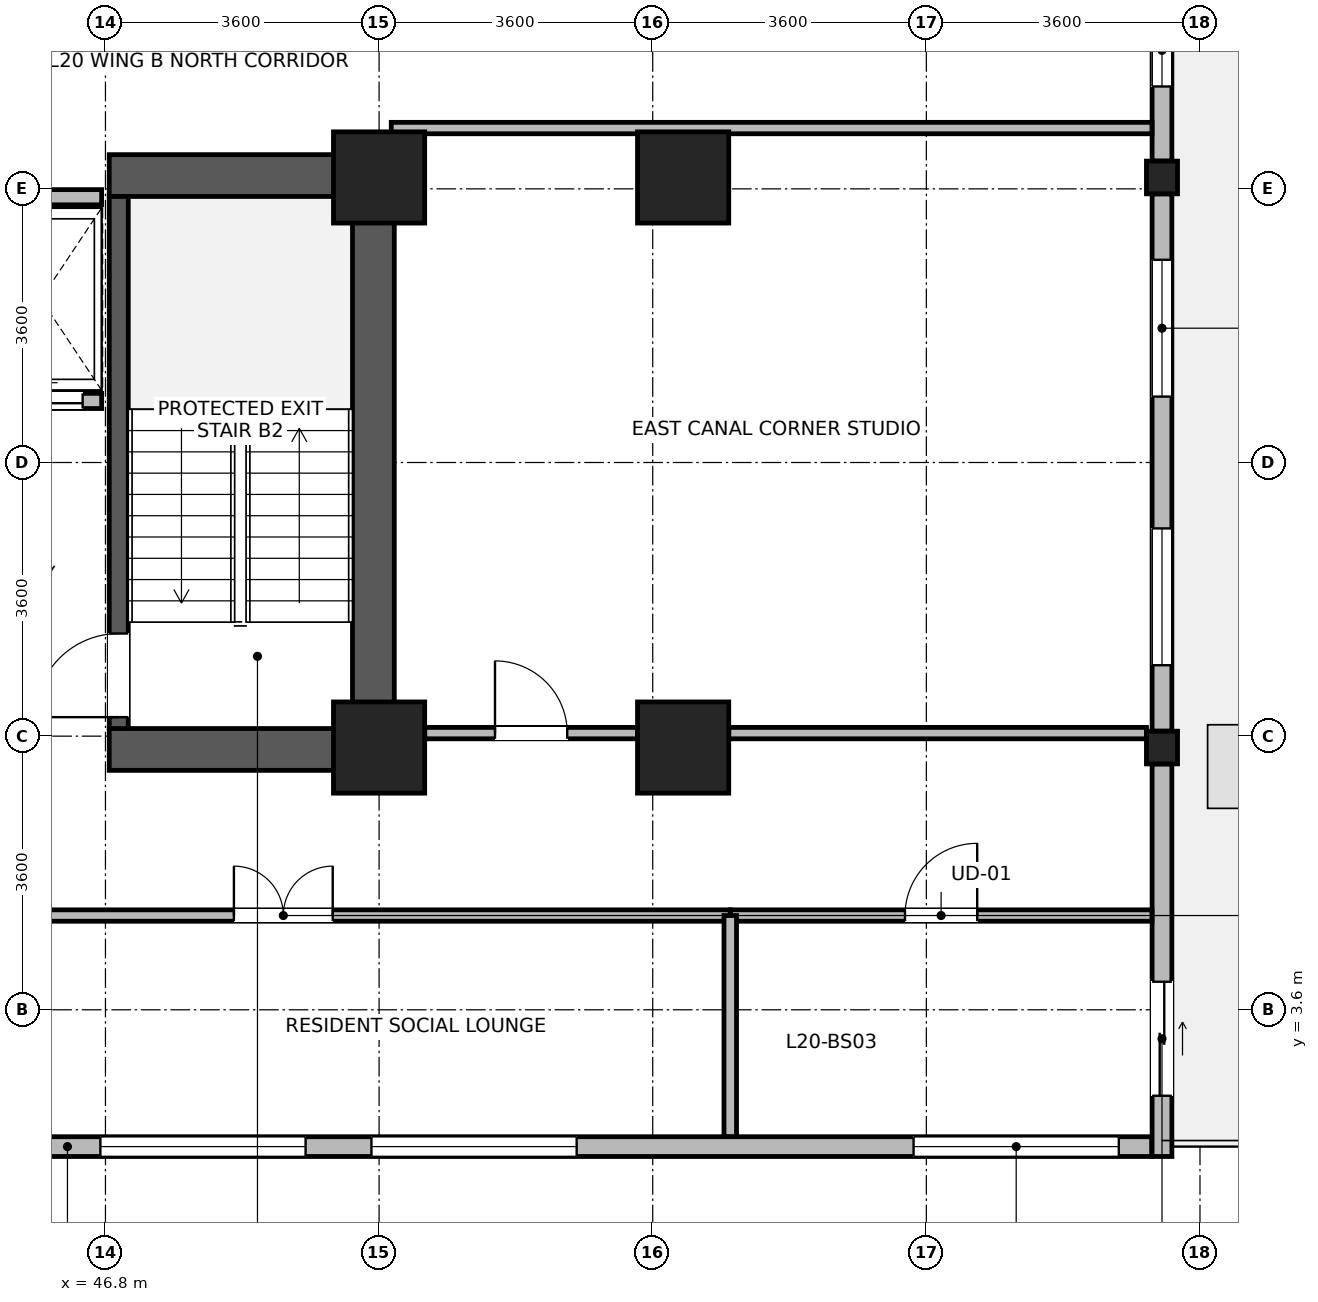
"""IFC4 building model, lengths in metres.
Left out: names, types, materials, properties, quantities, classifications, styles, units other than length and angle.
Written with IfcOpenShell. Run it as: python <this file> out.ifc"""

import sys

from ifc_helpers import new_model, si_unit, direction, frame, frame_2d, origin, origin_2d, place, context, subcontext, project, spatial, rectangle, i_section, extrude, source, transform, mapped, element, fill, save


model = new_model("IFC4")
c1 = context("Model", 3, precision=1e-05, world=origin(), true_north=direction((0.0, 1.0)))
c2 = subcontext(c1, "Body", "Model", "MODEL_VIEW")
j1 = project(units=[si_unit("LENGTHUNIT", "METRE"), si_unit("PLANEANGLEUNIT", "RADIAN")], contexts=[c1])
p1 = place(None, origin())
s1 = spatial("IfcSite", under=j1, at=p1, CompositionType="ELEMENT")
p2 = place(p1, origin())
s2 = spatial("IfcBuilding", under=s1, at=p2, CompositionType="ELEMENT")
p3 = place(p2, frame((0.0, 0.0, 82.3)))
s3 = spatial("IfcBuildingStorey", under=s2, at=p3, CompositionType="ELEMENT", Elevation=82.3)
p4 = place(p3, frame((50.325, 6.75, 0.0), z_axis=(0.0, 0.0, 1.0), x_axis=(0.0, 1.0, 0.0)))
e1 = element("IfcWall", 1, at=p4, inside=s3, PredefinedType="SHEAR", context=c2, shape_type="SweptSolid", body=[
    extrude(rectangle(XDim=8.1, YDim=0.55, at=frame_2d((4.05, 0.0))), origin(), (0.0, 0.0, 1.0), 3.45),
])
for number, where, z_axis, x_axis in (
    (2, (46.85, 7.025, 0.0), (0.0, 0.0, 1.0), (1.0, 0.0, 0.0)),
    (3, (46.85, 14.575, 0.0), (0.0, 0.0, 1.0), (1.0, 0.0, 0.0)),
):
    element("IfcWall", number, at=place(p3, frame(where, z_axis=z_axis, x_axis=x_axis)), inside=s3, PredefinedType="SHEAR", context=c2, shape_type="SweptSolid", body=[
        extrude(rectangle(XDim=3.2, YDim=0.55, at=frame_2d((1.6, 0.0))), origin(), (0.0, 0.0, 1.0), 3.45),
    ])
p5 = place(p3, frame((46.975, 7.3, 0.0), z_axis=(0.0, 0.0, 1.0), x_axis=(0.0, 1.0, 0.0)))
e4 = element("IfcWall", 4, at=p5, inside=s3, PredefinedType="SHEAR", context=c2, shape_type="SweptSolid", body=[
    extrude(rectangle(XDim=7.0, YDim=0.25, at=frame_2d((3.5, 0.0))), origin(), (0.0, 0.0, 1.0), 3.45),
])
p6 = place(p5, frame((0.15, 0.0, 0.0)))
e5 = element("IfcOpeningElement", 5, at=p6, cuts=e4, PredefinedType="OPENING", context=c2, shape_type="SweptSolid", body=[
    extrude(rectangle(XDim=1.1, YDim=2.08, at=frame_2d((0.55, 1.04))), frame((0.0, 0.135, 0.0), z_axis=(0.0, -1.0, 0.0), x_axis=(1.0, 0.0, 0.0)), (0.0, 0.0, 1.0), 0.27),
])
m1 = source(origin(), c2, "Body", "SweptSolid", [
    extrude(rectangle(XDim=1.2, YDim=1.2, at=origin_2d()), origin(), (0.0, 0.0, 1.0), 3.7),
])
for number, where, z_axis, x_axis in (
    (6, (50.4, 7.05, 0.0), (0.0, 0.0, 1.0), (1.0, 0.0, 0.0)),
    (7, (50.4, 14.55, 0.0), (0.0, 0.0, 1.0), (1.0, 0.0, 0.0)),
    (8, (54.4, 7.05, 0.0), (0.0, 0.0, 1.0), (1.0, 0.0, 0.0)),
    (9, (54.4, 14.55, 0.0), (0.0, 0.0, 1.0), (1.0, 0.0, 0.0)),
):
    element("IfcColumn", number, at=place(p3, frame(where, z_axis=z_axis, x_axis=x_axis)), inside=s3, PredefinedType="COLUMN", context=c2, shape_type="MappedRepresentation", body=[
        mapped(m1, transform((0.0, 0.0, 0.0), x_axis=(1.0, 0.0, 0.0), y_axis=(0.0, 1.0, 0.0), z_axis=(0.0, 0.0, 1.0), scale=1.0)),
    ])
m2 = source(origin(), c2, "Body", "SweptSolid", [
    extrude(i_section(OverallWidth=0.409, OverallDepth=0.43, WebThickness=0.024, FlangeThickness=0.033, FilletRadius=0.015, at=origin_2d()), origin(), (0.0, 0.0, 1.0), 3.7),
])
for number, where, z_axis, x_axis in (
    (10, (60.7, 7.05, 0.0), (0.0, 0.0, 1.0), (1.0, 0.0, 0.0)),
    (11, (60.7, 14.55, 0.0), (0.0, 0.0, 1.0), (1.0, 0.0, 0.0)),
):
    element("IfcColumn", number, at=place(p3, frame(where, z_axis=z_axis, x_axis=x_axis)), inside=s3, PredefinedType="COLUMN", context=c2, shape_type="MappedRepresentation", body=[
        mapped(m2, transform((0.0, 0.0, 0.0), x_axis=(1.0, 0.0, 0.0), y_axis=(0.0, 1.0, 0.0), z_axis=(0.0, 0.0, 1.0), scale=1.0)),
    ])
p7 = place(p3, frame((60.565, 1.8, 0.0), z_axis=(0.0, 0.0, 1.0), x_axis=(-1.0, 0.0, 0.0)))
e12 = element("IfcWall", 12, at=p7, inside=s3, PredefinedType="STANDARD", context=c2, shape_type="SweptSolid", body=[
    extrude(rectangle(XDim=28.53, YDim=0.26, at=frame_2d((14.265, 0.0))), origin(), (0.0, 0.0, 1.0), 3.43),
])
p8 = place(p7, frame((0.433, 0.0, 0.85)))
e13 = element("IfcOpeningElement", 13, at=p8, cuts=e12, PredefinedType="OPENING", context=c2, shape_type="SweptSolid", body=[
    extrude(rectangle(XDim=2.7, YDim=2.05, at=frame_2d((1.35, 1.025))), frame((0.0, 0.14, 0.0), z_axis=(0.0, -1.0, 0.0), x_axis=(1.0, 0.0, 0.0)), (0.0, 0.0, 1.0), 0.28),
])
p9 = place(p7, frame((7.566, 0.0, 0.85)))
e14 = element("IfcOpeningElement", 14, at=p9, cuts=e12, PredefinedType="OPENING", context=c2, shape_type="SweptSolid", body=[
    extrude(rectangle(XDim=2.7, YDim=2.05, at=frame_2d((1.35, 1.025))), frame((0.0, 0.14, 0.0), z_axis=(0.0, -1.0, 0.0), x_axis=(1.0, 0.0, 0.0)), (0.0, 0.0, 1.0), 0.28),
])
p10 = place(p7, frame((11.132, 0.0, 0.85)))
e15 = element("IfcOpeningElement", 15, at=p10, cuts=e12, PredefinedType="OPENING", context=c2, shape_type="SweptSolid", body=[
    extrude(rectangle(XDim=2.7, YDim=2.05, at=frame_2d((1.35, 1.025))), frame((0.0, 0.14, 0.0), z_axis=(0.0, -1.0, 0.0), x_axis=(1.0, 0.0, 0.0)), (0.0, 0.0, 1.0), 0.28),
])
p11 = place(p7, frame((18.264, 0.0, 0.85)))
e16 = element("IfcOpeningElement", 16, at=p11, cuts=e12, PredefinedType="OPENING", context=c2, shape_type="SweptSolid", body=[
    extrude(rectangle(XDim=2.7, YDim=2.05, at=frame_2d((1.35, 1.025))), frame((0.0, 0.14, 0.0), z_axis=(0.0, -1.0, 0.0), x_axis=(1.0, 0.0, 0.0)), (0.0, 0.0, 1.0), 0.28),
])
p12 = place(p7, frame((21.831, 0.0, 0.85)))
e17 = element("IfcOpeningElement", 17, at=p12, cuts=e12, PredefinedType="OPENING", context=c2, shape_type="SweptSolid", body=[
    extrude(rectangle(XDim=2.7, YDim=2.05, at=frame_2d((1.35, 1.025))), frame((0.0, 0.14, 0.0), z_axis=(0.0, -1.0, 0.0), x_axis=(1.0, 0.0, 0.0)), (0.0, 0.0, 1.0), 0.28),
])
p13 = place(p7, frame((25.397, 0.0, 0.85)))
e18 = element("IfcOpeningElement", 18, at=p13, cuts=e12, PredefinedType="OPENING", context=c2, shape_type="SweptSolid", body=[
    extrude(rectangle(XDim=2.7, YDim=2.05, at=frame_2d((1.35, 1.025))), frame((0.0, 0.14, 0.0), z_axis=(0.0, -1.0, 0.0), x_axis=(1.0, 0.0, 0.0)), (0.0, 0.0, 1.0), 0.28),
])
p14 = place(p3, frame((60.7, 6.834, 0.0), z_axis=(0.0, 0.0, 1.0), x_axis=(0.0, -1.0, 0.0)))
e19 = element("IfcWall", 19, at=p14, inside=s3, PredefinedType="STANDARD", context=c2, shape_type="SweptSolid", body=[
    extrude(rectangle(XDim=5.164, YDim=0.26, at=frame_2d((2.582, 0.0))), origin(), (0.0, 0.0, 1.0), 3.43),
])
p15 = place(p14, frame((2.865, 0.0, 0.0)))
e20 = element("IfcOpeningElement", 20, at=p15, cuts=e19, PredefinedType="OPENING", context=c2, shape_type="SweptSolid", body=[
    extrude(rectangle(XDim=1.5, YDim=2.15, at=frame_2d((0.75, 1.075))), frame((0.0, 0.14, 0.0), z_axis=(0.0, -1.0, 0.0), x_axis=(1.0, 0.0, 0.0)), (0.0, 0.0, 1.0), 0.28),
])
p16 = place(p3, frame((60.7, 14.334, 0.0), z_axis=(0.0, 0.0, 1.0), x_axis=(0.0, -1.0, 0.0)))
e21 = element("IfcWall", 21, at=p16, inside=s3, PredefinedType="STANDARD", context=c2, shape_type="SweptSolid", body=[
    extrude(rectangle(XDim=7.068, YDim=0.26, at=frame_2d((3.534, 0.0))), origin(), (0.0, 0.0, 1.0), 2.93),
])
p17 = place(p16, frame((0.867, 0.0, 0.85)))
e22 = element("IfcOpeningElement", 22, at=p17, cuts=e21, PredefinedType="OPENING", context=c2, shape_type="SweptSolid", body=[
    extrude(rectangle(XDim=1.8, YDim=1.85, at=frame_2d((0.9, 0.925))), frame((0.0, 0.14, 0.0), z_axis=(0.0, -1.0, 0.0), x_axis=(1.0, 0.0, 0.0)), (0.0, 0.0, 1.0), 0.28),
])
p18 = place(p16, frame((4.401, 0.0, 0.85)))
e23 = element("IfcOpeningElement", 23, at=p18, cuts=e21, PredefinedType="OPENING", context=c2, shape_type="SweptSolid", body=[
    extrude(rectangle(XDim=1.8, YDim=1.85, at=frame_2d((0.9, 0.925))), frame((0.0, 0.14, 0.0), z_axis=(0.0, -1.0, 0.0), x_axis=(1.0, 0.0, 0.0)), (0.0, 0.0, 1.0), 0.28),
])
p19 = place(p3, frame((60.7, 21.384, 0.0), z_axis=(0.0, 0.0, 1.0), x_axis=(0.0, -1.0, 0.0)))
e24 = element("IfcWall", 24, at=p19, inside=s3, PredefinedType="STANDARD", context=c2, shape_type="SweptSolid", body=[
    extrude(rectangle(XDim=6.618, YDim=0.26, at=frame_2d((3.309, 0.0))), origin(), (0.0, 0.0, 1.0), 2.93),
])
p20 = place(p19, frame((0.754, 0.0, 0.85)))
e25 = element("IfcOpeningElement", 25, at=p20, cuts=e24, PredefinedType="OPENING", context=c2, shape_type="SweptSolid", body=[
    extrude(rectangle(XDim=1.8, YDim=1.85, at=frame_2d((0.9, 0.925))), frame((0.0, 0.14, 0.0), z_axis=(0.0, -1.0, 0.0), x_axis=(1.0, 0.0, 0.0)), (0.0, 0.0, 1.0), 0.28),
])
p21 = place(p19, frame((4.687, 0.0, 0.85)))
e26 = element("IfcOpeningElement", 26, at=p21, cuts=e24, PredefinedType="OPENING", context=c2, shape_type="SweptSolid", body=[
    extrude(rectangle(XDim=0.95, YDim=1.75, at=frame_2d((0.475, 0.875))), frame((0.0, 0.14, 0.0), z_axis=(0.0, -1.0, 0.0), x_axis=(1.0, 0.0, 0.0)), (0.0, 0.0, 1.0), 0.28),
])
p22 = place(p3, frame((45.15, 11.61, 0.0), z_axis=(0.0, 0.0, 1.0), x_axis=(1.0, 0.0, 0.0)))
e27 = element("IfcWall", 27, at=p22, inside=s3, PredefinedType="PARTITIONING", context=c2, shape_type="SweptSolid", body=[
    extrude(rectangle(XDim=1.6, YDim=0.2, at=frame_2d((0.8, 0.0))), origin(), (0.0, 0.0, 1.0), 3.43),
])
p23 = place(p22, frame((0.25, 0.0, 0.0)))
e28 = element("IfcOpeningElement", 28, at=p23, cuts=e27, PredefinedType="OPENING", context=c2, shape_type="SweptSolid", body=[
    extrude(rectangle(XDim=1.1, YDim=2.12, at=frame_2d((0.55, 1.06))), frame((0.0, 0.11, 0.0), z_axis=(0.0, -1.0, 0.0), x_axis=(1.0, 0.0, 0.0)), (0.0, 0.0, 1.0), 0.22),
])
p24 = place(p3, frame((45.15, 14.29, 0.0), z_axis=(0.0, 0.0, 1.0), x_axis=(1.0, 0.0, 0.0)))
e29 = element("IfcWall", 29, at=p24, inside=s3, PredefinedType="PARTITIONING", context=c2, shape_type="SweptSolid", body=[
    extrude(rectangle(XDim=1.6, YDim=0.2, at=frame_2d((0.8, 0.0))), origin(), (0.0, 0.0, 1.0), 2.23),
])
p25 = place(p3, frame((43.26, 4.84, 0.0), z_axis=(0.0, 0.0, 1.0), x_axis=(1.0, 0.0, 0.0)))
e30 = element("IfcWall", 30, at=p25, inside=s3, PredefinedType="PARTITIONING", context=c2, shape_type="SweptSolid", body=[
    extrude(rectangle(XDim=11.76, YDim=0.15, at=frame_2d((5.88, 0.0))), origin(), (0.0, 0.0, 1.0), 3.43),
])
p26 = place(p25, frame((5.23, 0.0, 0.0)))
e31 = element("IfcOpeningElement", 31, at=p26, cuts=e30, PredefinedType="OPENING", context=c2, shape_type="SweptSolid", body=[
    extrude(rectangle(XDim=1.3, YDim=2.12, at=frame_2d((0.65, 1.06))), frame((0.0, 0.085, 0.0), z_axis=(0.0, -1.0, 0.0), x_axis=(1.0, 0.0, 0.0)), (0.0, 0.0, 1.0), 0.17),
])
p27 = place(p3, frame((51.0, 7.24, 0.0), z_axis=(0.0, 0.0, 1.0), x_axis=(1.0, 0.0, 0.0)))
e32 = element("IfcWall", 32, at=p27, inside=s3, PredefinedType="PARTITIONING", context=c2, shape_type="SweptSolid", body=[
    extrude(rectangle(XDim=2.8, YDim=0.15, at=frame_2d((1.4, 0.0))), origin(), (0.0, 0.0, 1.0), 2.78),
])
p28 = place(p27, frame((0.925, 0.0, 0.0)))
e33 = element("IfcOpeningElement", 33, at=p28, cuts=e32, PredefinedType="OPENING", context=c2, shape_type="SweptSolid", body=[
    extrude(rectangle(XDim=0.95, YDim=2.1, at=frame_2d((0.475, 1.05))), frame((0.0, 0.085, 0.0), z_axis=(0.0, -1.0, 0.0), x_axis=(1.0, 0.0, 0.0)), (0.0, 0.0, 1.0), 0.17),
])
p29 = place(p3, frame((55.0, 7.24, 0.0), z_axis=(0.0, 0.0, 1.0), x_axis=(1.0, 0.0, 0.0)))
e34 = element("IfcWall", 34, at=p29, inside=s3, PredefinedType="PARTITIONING", context=c2, shape_type="SweptSolid", body=[
    extrude(rectangle(XDim=5.496, YDim=0.15, at=frame_2d((2.748, 0.0))), origin(), (0.0, 0.0, 1.0), 2.78),
])
p30 = place(p3, frame((50.56, 15.2, 0.0), z_axis=(0.0, 0.0, 1.0), x_axis=(1.0, 0.0, 0.0)))
e35 = element("IfcWall", 35, at=p30, inside=s3, PredefinedType="PARTITIONING", context=c2, shape_type="SweptSolid", body=[
    extrude(rectangle(XDim=10.008, YDim=0.15, at=frame_2d((5.004, 0.0))), origin(), (0.0, 0.0, 1.0), 3.43),
])
p31 = place(p3, frame((55.02, 4.84, 0.0), z_axis=(0.0, 0.0, 1.0), x_axis=(1.0, 0.0, 0.0)))
e36 = element("IfcWall", 36, at=p31, inside=s3, PredefinedType="PARTITIONING", context=c2, shape_type="SweptSolid", body=[
    extrude(rectangle(XDim=5.548, YDim=0.15, at=frame_2d((2.774, 0.0))), origin(), (0.0, 0.0, 1.0), 3.43),
])
p32 = place(p31, frame((2.299, 0.0, 0.0)))
e37 = element("IfcOpeningElement", 37, at=p32, cuts=e36, PredefinedType="OPENING", context=c2, shape_type="SweptSolid", body=[
    extrude(rectangle(XDim=0.95, YDim=2.1, at=frame_2d((0.475, 1.05))), frame((0.0, 0.085, 0.0), z_axis=(0.0, -1.0, 0.0), x_axis=(1.0, 0.0, 0.0)), (0.0, 0.0, 1.0), 0.17),
])
p33 = place(p3, frame((55.02, 1.932, 0.0), z_axis=(0.0, 0.0, 1.0), x_axis=(0.0, 1.0, 0.0)))
e38 = element("IfcWall", 38, at=p33, inside=s3, PredefinedType="PARTITIONING", context=c2, shape_type="SweptSolid", body=[
    extrude(rectangle(XDim=2.908, YDim=0.165, at=frame_2d((1.454, 0.0))), origin(), (0.0, 0.0, 1.0), 3.43),
])
p34 = place(p8, origin())
e39 = element("IfcWindow", 39, at=p34, inside=s3, PartitioningType="SINGLE_PANEL", PredefinedType="WINDOW", context=c2, shape_type="SweptSolid", body=[
    extrude(rectangle(XDim=2.7, YDim=2.05, at=frame_2d((1.35, 1.025))), frame((0.0, 0.03, 0.0), z_axis=(0.0, -1.0, 0.0), x_axis=(1.0, 0.0, 0.0)), (0.0, 0.0, 1.0), 0.06),
])
fill(e13, e39)
p35 = place(p9, origin())
e40 = element("IfcWindow", 40, at=p35, inside=s3, PartitioningType="SINGLE_PANEL", PredefinedType="WINDOW", context=c2, shape_type="SweptSolid", body=[
    extrude(rectangle(XDim=2.7, YDim=2.05, at=frame_2d((1.35, 1.025))), frame((0.0, 0.03, 0.0), z_axis=(0.0, -1.0, 0.0), x_axis=(1.0, 0.0, 0.0)), (0.0, 0.0, 1.0), 0.06),
])
fill(e14, e40)
p36 = place(p10, origin())
e41 = element("IfcWindow", 41, at=p36, inside=s3, PartitioningType="SINGLE_PANEL", PredefinedType="WINDOW", context=c2, shape_type="SweptSolid", body=[
    extrude(rectangle(XDim=2.7, YDim=2.05, at=frame_2d((1.35, 1.025))), frame((0.0, 0.03, 0.0), z_axis=(0.0, -1.0, 0.0), x_axis=(1.0, 0.0, 0.0)), (0.0, 0.0, 1.0), 0.06),
])
fill(e15, e41)
p37 = place(p15, origin())
e42 = element("IfcDoor", 42, at=p37, inside=s3, OperationType="SLIDING_TO_LEFT", PredefinedType="DOOR", context=c2, shape_type="SweptSolid", body=[
    extrude(rectangle(XDim=1.5, YDim=2.15, at=frame_2d((0.75, 1.075))), frame((0.0, 0.025, 0.0), z_axis=(0.0, -1.0, 0.0), x_axis=(1.0, 0.0, 0.0)), (0.0, 0.0, 1.0), 0.05),
])
fill(e20, e42)
p38 = place(p17, origin())
e43 = element("IfcWindow", 43, at=p38, inside=s3, PartitioningType="SINGLE_PANEL", PredefinedType="WINDOW", context=c2, shape_type="SweptSolid", body=[
    extrude(rectangle(XDim=1.8, YDim=1.85, at=frame_2d((0.9, 0.925))), frame((0.0, 0.03, 0.0), z_axis=(0.0, -1.0, 0.0), x_axis=(1.0, 0.0, 0.0)), (0.0, 0.0, 1.0), 0.06),
])
fill(e22, e43)
p39 = place(p18, origin())
e44 = element("IfcWindow", 44, at=p39, inside=s3, PartitioningType="SINGLE_PANEL", PredefinedType="WINDOW", context=c2, shape_type="SweptSolid", body=[
    extrude(rectangle(XDim=1.8, YDim=1.85, at=frame_2d((0.9, 0.925))), frame((0.0, 0.03, 0.0), z_axis=(0.0, -1.0, 0.0), x_axis=(1.0, 0.0, 0.0)), (0.0, 0.0, 1.0), 0.06),
])
fill(e23, e44)
p40 = place(p21, origin())
e45 = element("IfcWindow", 45, at=p40, inside=s3, PartitioningType="SINGLE_PANEL", PredefinedType="WINDOW", context=c2, shape_type="SweptSolid", body=[
    extrude(rectangle(XDim=0.95, YDim=1.75, at=frame_2d((0.475, 0.875))), frame((0.0, 0.03, 0.0), z_axis=(0.0, -1.0, 0.0), x_axis=(1.0, 0.0, 0.0)), (0.0, 0.0, 1.0), 0.06),
])
fill(e26, e45)
p41 = place(p6, origin())
e46 = element("IfcDoor", 46, at=p41, inside=s3, OperationType="SINGLE_SWING_LEFT", PredefinedType="DOOR", context=c2, shape_type="SweptSolid", body=[
    extrude(rectangle(XDim=1.1, YDim=2.08, at=frame_2d((0.55, 1.04))), frame((0.0, 0.025, 0.0), z_axis=(0.0, -1.0, 0.0), x_axis=(1.0, 0.0, 0.0)), (0.0, 0.0, 1.0), 0.05),
])
fill(e5, e46)
p42 = place(p23, origin())
e47 = element("IfcDoor", 47, at=p42, inside=s3, OperationType="SLIDING_TO_LEFT", PredefinedType="DOOR", context=c2, shape_type="SweptSolid", body=[
    extrude(rectangle(XDim=1.1, YDim=2.12, at=frame_2d((0.55, 1.06))), frame((0.0, 0.025, 0.0), z_axis=(0.0, -1.0, 0.0), x_axis=(1.0, 0.0, 0.0)), (0.0, 0.0, 1.0), 0.05),
])
fill(e28, e47)
p43 = place(p26, origin())
e48 = element("IfcDoor", 48, at=p43, inside=s3, OperationType="DOUBLE_DOOR_SINGLE_SWING", PredefinedType="DOOR", context=c2, shape_type="SweptSolid", body=[
    extrude(rectangle(XDim=1.3, YDim=2.12, at=frame_2d((0.65, 1.06))), frame((0.0, 0.025, 0.0), z_axis=(0.0, -1.0, 0.0), x_axis=(1.0, 0.0, 0.0)), (0.0, 0.0, 1.0), 0.05),
])
fill(e31, e48)
p44 = place(p28, origin())
e49 = element("IfcDoor", 49, at=p44, inside=s3, OperationType="SINGLE_SWING_LEFT", PredefinedType="DOOR", context=c2, shape_type="SweptSolid", body=[
    extrude(rectangle(XDim=0.95, YDim=2.1, at=frame_2d((0.475, 1.05))), frame((0.0, 0.025, 0.0), z_axis=(0.0, -1.0, 0.0), x_axis=(1.0, 0.0, 0.0)), (0.0, 0.0, 1.0), 0.05),
])
fill(e33, e49)
p45 = place(p32, origin())
e50 = element("IfcDoor", 50, at=p45, inside=s3, OperationType="SINGLE_SWING_RIGHT", PredefinedType="DOOR", context=c2, shape_type="SweptSolid", body=[
    extrude(rectangle(XDim=0.95, YDim=2.1, at=frame_2d((0.475, 1.05))), frame((0.0, 0.025, 0.0), z_axis=(0.0, -1.0, 0.0), x_axis=(1.0, 0.0, 0.0)), (0.0, 0.0, 1.0), 0.05),
])
fill(e37, e50)
save(model, sys.argv[1])
